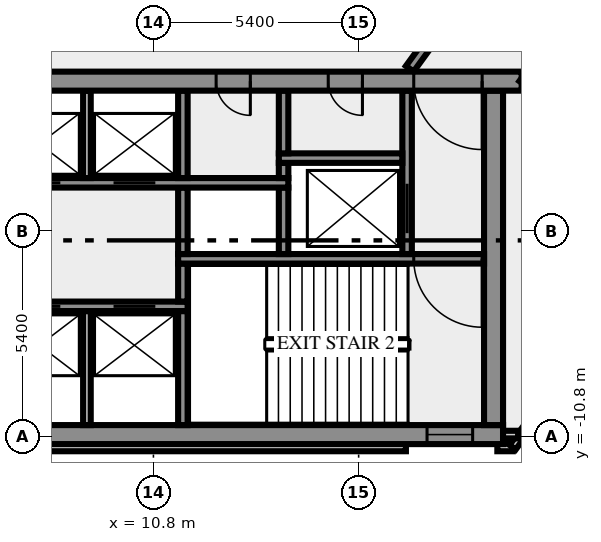
"""IFC4 building model, lengths in metres.
Left out: names, types, materials, properties, quantities, classifications, styles, units other than length and angle.
Written with IfcOpenShell. Run it as: python <this file> out.ifc"""

import sys

from ifc_helpers import new_model, si_unit, direction, frame, frame_2d, origin, place, context, subcontext, project, spatial, rectangle, extrude, element, fill, save


model = new_model("IFC4")
c1 = context("Model", 3, precision=1e-05, world=origin(), true_north=direction((0.0, 1.0)))
c2 = subcontext(c1, "Body", "Model", "MODEL_VIEW")
j1 = project(units=[si_unit("LENGTHUNIT", "METRE"), si_unit("PLANEANGLEUNIT", "RADIAN")], contexts=[c1])
p1 = place(None, origin())
s1 = spatial("IfcSite", under=j1, at=p1, CompositionType="ELEMENT")
p2 = place(p1, origin())
s2 = spatial("IfcBuilding", under=s1, at=p2, CompositionType="ELEMENT")
p3 = place(p2, frame((0.0, 0.0, 176.0)))
s3 = spatial("IfcBuildingStorey", under=s2, at=p3, CompositionType="ELEMENT", Elevation=176.0)
p4 = place(p3, frame((-17.444, -11.088, 0.0), z_axis=(0.0, 0.0, 1.0), x_axis=(1.0, 0.0, 0.0)))
e1 = element("IfcWall", 1, at=p4, inside=s3, PredefinedType="SOLIDWALL", context=c2, shape_type="SweptSolid", body=[
    extrude(rectangle(XDim=34.888, YDim=0.2, at=frame_2d((17.444, 0.0))), origin(), (0.0, 0.0, 1.0), 3.65),
])
p5 = place(p3, frame((19.85, -11.088, 0.0), z_axis=(0.0, 0.0, 1.0), x_axis=(1.0, 0.0, 0.0)))
e2 = element("IfcWall", 2, at=p5, inside=s3, PredefinedType="SOLIDWALL", context=c2, shape_type="SweptSolid", body=[
    extrude(rectangle(XDim=0.406, YDim=0.2, at=frame_2d((0.203, 0.0))), origin(), (0.0, 0.0, 1.0), 3.65),
])
p6 = place(p3, frame((20.253, -11.083, 0.0), z_axis=(0.0, 0.0, 1.0), x_axis=(0.587766567315, 0.809030569476, 0.0)))
e3 = element("IfcWall", 3, at=p6, inside=s3, PredefinedType="SOLIDWALL", context=c2, shape_type="SweptSolid", body=[
    extrude(rectangle(XDim=2.688, YDim=0.2, at=frame_2d((1.344, 0.0))), origin(), (0.0, 0.0, 1.0), 3.65),
])
p7 = place(p3, frame((19.98, -10.75, 0.0), z_axis=(0.0, 0.0, 1.0), x_axis=(1.0, 0.0, 0.0)))
e4 = element("IfcWall", 4, at=p7, inside=s3, PredefinedType="SOLIDWALL", context=c2, shape_type="SweptSolid", body=[
    extrude(rectangle(XDim=0.417, YDim=0.2, at=frame_2d((0.208, 0.0))), origin(), (0.0, 0.0, 1.0), 3.65),
])
p8 = place(p3, frame((-20.0, -10.75, 0.0), z_axis=(0.0, 0.0, 1.0), x_axis=(1.0, 0.0, 0.0)))
e5 = element("IfcWall", 5, at=p8, inside=s3, PredefinedType="SHEAR", context=c2, shape_type="SweptSolid", body=[
    extrude(rectangle(XDim=40.0, YDim=0.5, at=frame_2d((20.0, 0.0))), origin(), (0.0, 0.0, 1.0), 3.65),
])
p9 = place(p8, frame((0.8, 0.0, 1.0)))
e6 = element("IfcOpeningElement", 6, at=p9, cuts=e5, PredefinedType="OPENING", context=c2, shape_type="SweptSolid", body=[
    extrude(rectangle(XDim=1.2, YDim=1.2, at=frame_2d((0.6, 0.6))), frame((0.0, 0.26, 0.0), z_axis=(0.0, -1.0, 0.0), x_axis=(1.0, 0.0, 0.0)), (0.0, 0.0, 1.0), 0.52),
])
p10 = place(p8, frame((38.0, 0.0, 1.0)))
e7 = element("IfcOpeningElement", 7, at=p10, cuts=e5, PredefinedType="OPENING", context=c2, shape_type="SweptSolid", body=[
    extrude(rectangle(XDim=1.2, YDim=1.2, at=frame_2d((0.6, 0.6))), frame((0.0, 0.26, 0.0), z_axis=(0.0, -1.0, 0.0), x_axis=(1.0, 0.0, 0.0)), (0.0, 0.0, 1.0), 0.52),
])
p11 = place(p3, frame((9.05, -10.5, 0.0), z_axis=(0.0, 0.0, 1.0), x_axis=(0.0, 1.0, 0.0)))
e8 = element("IfcWall", 8, at=p11, inside=s3, PredefinedType="SOLIDWALL", context=c2, shape_type="SweptSolid", body=[
    extrude(rectangle(XDim=3.0, YDim=0.2, at=frame_2d((1.5, 0.0))), origin(), (0.0, 0.0, 1.0), 3.65),
])
p12 = place(p3, frame((11.575, -10.5, 0.0), z_axis=(0.0, 0.0, 1.0), x_axis=(0.0, 1.0, 0.0)))
e9 = element("IfcWall", 9, at=p12, inside=s3, PredefinedType="SHEAR", context=c2, shape_type="SweptSolid", body=[
    extrude(rectangle(XDim=3.0, YDim=0.25, at=frame_2d((1.5, 0.0))), origin(), (0.0, 0.0, 1.0), 3.65),
])
p13 = place(p3, frame((19.75, -10.5, 0.0), z_axis=(0.0, 0.0, 1.0), x_axis=(0.0, 1.0, 0.0)))
e10 = element("IfcWall", 10, at=p13, inside=s3, PredefinedType="SHEAR", context=c2, shape_type="SweptSolid", body=[
    extrude(rectangle(XDim=8.8, YDim=0.5, at=frame_2d((4.4, 0.0))), origin(), (0.0, 0.0, 1.0), 3.65),
])
p14 = place(p3, frame((11.7, -7.375, 0.0), z_axis=(0.0, 0.0, 1.0), x_axis=(-1.0, 0.0, 0.0)))
e11 = element("IfcWall", 11, at=p14, inside=s3, PredefinedType="SHEAR", context=c2, shape_type="SweptSolid", body=[
    extrude(rectangle(XDim=23.4, YDim=0.25, at=frame_2d((11.7, 0.0))), origin(), (0.0, 0.0, 1.0), 3.65),
])
p15 = place(p14, frame((20.213, 0.0, 0.0)))
e12 = element("IfcOpeningElement", 12, at=p15, cuts=e11, PredefinedType="OPENING", context=c2, shape_type="SweptSolid", body=[
    extrude(rectangle(XDim=0.9, YDim=2.1, at=frame_2d((0.45, 1.05))), frame((0.0, 0.135, 0.0), z_axis=(0.0, -1.0, 0.0), x_axis=(1.0, 0.0, 0.0)), (0.0, 0.0, 1.0), 0.27),
])
p16 = place(p14, frame((16.488, 0.0, 0.0)))
e13 = element("IfcOpeningElement", 13, at=p16, cuts=e11, PredefinedType="OPENING", context=c2, shape_type="SweptSolid", body=[
    extrude(rectangle(XDim=0.9, YDim=2.1, at=frame_2d((0.45, 1.05))), frame((0.0, 0.135, 0.0), z_axis=(0.0, -1.0, 0.0), x_axis=(1.0, 0.0, 0.0)), (0.0, 0.0, 1.0), 0.27),
])
p17 = place(p14, frame((14.45, 0.0, 0.0)))
e14 = element("IfcOpeningElement", 14, at=p17, cuts=e11, PredefinedType="OPENING", context=c2, shape_type="SweptSolid", body=[
    extrude(rectangle(XDim=0.9, YDim=2.1, at=frame_2d((0.45, 1.05))), frame((0.0, 0.135, 0.0), z_axis=(0.0, -1.0, 0.0), x_axis=(1.0, 0.0, 0.0)), (0.0, 0.0, 1.0), 0.27),
])
p18 = place(p14, frame((12.95, 0.0, 0.0)))
e15 = element("IfcOpeningElement", 15, at=p18, cuts=e11, PredefinedType="OPENING", context=c2, shape_type="SweptSolid", body=[
    extrude(rectangle(XDim=0.9, YDim=2.1, at=frame_2d((0.45, 1.05))), frame((0.0, 0.135, 0.0), z_axis=(0.0, -1.0, 0.0), x_axis=(1.0, 0.0, 0.0)), (0.0, 0.0, 1.0), 0.27),
])
p19 = place(p14, frame((11.475, 0.0, 0.0)))
e16 = element("IfcOpeningElement", 16, at=p19, cuts=e11, PredefinedType="OPENING", context=c2, shape_type="SweptSolid", body=[
    extrude(rectangle(XDim=0.9, YDim=2.1, at=frame_2d((0.45, 1.05))), frame((0.0, 0.135, 0.0), z_axis=(0.0, -1.0, 0.0), x_axis=(1.0, 0.0, 0.0)), (0.0, 0.0, 1.0), 0.27),
])
p20 = place(p14, frame((10.45, 0.0, 0.0)))
e17 = element("IfcOpeningElement", 17, at=p20, cuts=e11, PredefinedType="OPENING", context=c2, shape_type="SweptSolid", body=[
    extrude(rectangle(XDim=0.5, YDim=2.1, at=frame_2d((0.25, 1.05))), frame((0.0, 0.135, 0.0), z_axis=(0.0, -1.0, 0.0), x_axis=(1.0, 0.0, 0.0)), (0.0, 0.0, 1.0), 0.27),
])
p21 = place(p14, frame((8.35, 0.0, 0.0)))
e18 = element("IfcOpeningElement", 18, at=p21, cuts=e11, PredefinedType="OPENING", context=c2, shape_type="SweptSolid", body=[
    extrude(rectangle(XDim=1.1, YDim=2.1, at=frame_2d((0.55, 1.05))), frame((0.0, 0.135, 0.0), z_axis=(0.0, -1.0, 0.0), x_axis=(1.0, 0.0, 0.0)), (0.0, 0.0, 1.0), 0.27),
])
p22 = place(p14, frame((5.85, 0.0, 0.0)))
e19 = element("IfcOpeningElement", 19, at=p22, cuts=e11, PredefinedType="OPENING", context=c2, shape_type="SweptSolid", body=[
    extrude(rectangle(XDim=1.1, YDim=2.1, at=frame_2d((0.55, 1.05))), frame((0.0, 0.135, 0.0), z_axis=(0.0, -1.0, 0.0), x_axis=(1.0, 0.0, 0.0)), (0.0, 0.0, 1.0), 0.27),
])
p23 = place(p14, frame((3.35, 0.0, 0.0)))
e20 = element("IfcOpeningElement", 20, at=p23, cuts=e11, PredefinedType="OPENING", context=c2, shape_type="SweptSolid", body=[
    extrude(rectangle(XDim=1.1, YDim=2.1, at=frame_2d((0.55, 1.05))), frame((0.0, 0.135, 0.0), z_axis=(0.0, -1.0, 0.0), x_axis=(1.0, 0.0, 0.0)), (0.0, 0.0, 1.0), 0.27),
])
p24 = place(p14, frame((0.85, 0.0, 0.0)))
e21 = element("IfcOpeningElement", 21, at=p24, cuts=e11, PredefinedType="OPENING", context=c2, shape_type="SweptSolid", body=[
    extrude(rectangle(XDim=1.1, YDim=2.1, at=frame_2d((0.55, 1.05))), frame((0.0, 0.135, 0.0), z_axis=(0.0, -1.0, 0.0), x_axis=(1.0, 0.0, 0.0)), (0.0, 0.0, 1.0), 0.27),
])
p25 = place(p3, frame((11.575, -7.25, 0.0), z_axis=(0.0, 0.0, 1.0), x_axis=(0.0, 1.0, 0.0)))
e22 = element("IfcWall", 22, at=p25, inside=s3, PredefinedType="SHEAR", context=c2, shape_type="SweptSolid", body=[
    extrude(rectangle(XDim=1.0, YDim=0.25, at=frame_2d((0.5, 0.0))), origin(), (0.0, 0.0, 1.0), 3.65),
])
p26 = place(p3, frame((19.5, -6.125, 0.0), z_axis=(0.0, 0.0, 1.0), x_axis=(-1.0, 0.0, 0.0)))
e23 = element("IfcWall", 23, at=p26, inside=s3, PredefinedType="SHEAR", context=c2, shape_type="SweptSolid", body=[
    extrude(rectangle(XDim=8.05, YDim=0.25, at=frame_2d((4.025, 0.0))), origin(), (0.0, 0.0, 1.0), 3.65),
])
p27 = place(p26, frame((0.05, 0.0, 0.0)))
e24 = element("IfcOpeningElement", 24, at=p27, cuts=e23, PredefinedType="OPENING", context=c2, shape_type="SweptSolid", body=[
    extrude(rectangle(XDim=1.8, YDim=2.1, at=frame_2d((0.9, 1.05))), frame((0.0, 0.135, 0.0), z_axis=(0.0, -1.0, 0.0), x_axis=(1.0, 0.0, 0.0)), (0.0, 0.0, 1.0), 0.27),
])
for number, where, z_axis, x_axis in (
    (25, (11.575, -6.0, 0.0), (0.0, 0.0, 1.0), (0.0, 1.0, 0.0)),
    (26, (14.225, -6.0, 0.0), (0.0, 0.0, 1.0), (0.0, 1.0, 0.0)),
):
    element("IfcWall", number, at=place(p3, frame(where, z_axis=z_axis, x_axis=x_axis)), inside=s3, PredefinedType="SHEAR", context=c2, shape_type="SweptSolid", body=[
        extrude(rectangle(XDim=1.75, YDim=0.25, at=frame_2d((0.875, 0.0))), origin(), (0.0, 0.0, 1.0), 3.65),
    ])
p28 = place(p3, frame((17.475, -6.0, 0.0), z_axis=(0.0, 0.0, 1.0), x_axis=(0.0, 1.0, 0.0)))
e27 = element("IfcWall", 27, at=p28, inside=s3, PredefinedType="SHEAR", context=c2, shape_type="SweptSolid", body=[
    extrude(rectangle(XDim=4.3, YDim=0.25, at=frame_2d((2.15, 0.0))), origin(), (0.0, 0.0, 1.0), 3.65),
])
p29 = place(p28, frame((0.55, 0.0, 0.0)))
e28 = element("IfcOpeningElement", 28, at=p29, cuts=e27, PredefinedType="OPENING", context=c2, shape_type="SweptSolid", body=[
    extrude(rectangle(XDim=1.3, YDim=2.1, at=frame_2d((0.65, 1.05))), frame((0.0, 0.135, 0.0), z_axis=(0.0, -1.0, 0.0), x_axis=(1.0, 0.0, 0.0)), (0.0, 0.0, 1.0), 0.27),
])
p30 = place(p3, frame((-0.6, -4.125, 0.0), z_axis=(0.0, 0.0, 1.0), x_axis=(1.0, 0.0, 0.0)))
e29 = element("IfcWall", 29, at=p30, inside=s3, PredefinedType="SHEAR", context=c2, shape_type="SweptSolid", body=[
    extrude(rectangle(XDim=14.95, YDim=0.25, at=frame_2d((7.475, 0.0))), origin(), (0.0, 0.0, 1.0), 3.65),
])
p31 = place(p30, frame((2.75, 0.0, 0.0)))
e30 = element("IfcOpeningElement", 30, at=p31, cuts=e29, PredefinedType="OPENING", context=c2, shape_type="SweptSolid", body=[
    extrude(rectangle(XDim=1.3, YDim=2.1, at=frame_2d((0.65, 1.05))), frame((0.0, 0.135, 0.0), z_axis=(0.0, -1.0, 0.0), x_axis=(1.0, 0.0, 0.0)), (0.0, 0.0, 1.0), 0.27),
])
p32 = place(p30, frame((5.35, 0.0, 0.0)))
e31 = element("IfcOpeningElement", 31, at=p32, cuts=e29, PredefinedType="OPENING", context=c2, shape_type="SweptSolid", body=[
    extrude(rectangle(XDim=1.1, YDim=2.1, at=frame_2d((0.55, 1.05))), frame((0.0, 0.135, 0.0), z_axis=(0.0, -1.0, 0.0), x_axis=(1.0, 0.0, 0.0)), (0.0, 0.0, 1.0), 0.27),
])
p33 = place(p30, frame((7.85, 0.0, 0.0)))
e32 = element("IfcOpeningElement", 32, at=p33, cuts=e29, PredefinedType="OPENING", context=c2, shape_type="SweptSolid", body=[
    extrude(rectangle(XDim=1.1, YDim=2.1, at=frame_2d((0.55, 1.05))), frame((0.0, 0.135, 0.0), z_axis=(0.0, -1.0, 0.0), x_axis=(1.0, 0.0, 0.0)), (0.0, 0.0, 1.0), 0.27),
])
p34 = place(p30, frame((10.35, 0.0, 0.0)))
e33 = element("IfcOpeningElement", 33, at=p34, cuts=e29, PredefinedType="OPENING", context=c2, shape_type="SweptSolid", body=[
    extrude(rectangle(XDim=1.1, YDim=2.1, at=frame_2d((0.55, 1.05))), frame((0.0, 0.135, 0.0), z_axis=(0.0, -1.0, 0.0), x_axis=(1.0, 0.0, 0.0)), (0.0, 0.0, 1.0), 0.27),
])
p35 = place(p3, frame((9.05, -4.0, 0.0), z_axis=(0.0, 0.0, 1.0), x_axis=(0.0, 1.0, 0.0)))
e34 = element("IfcWall", 34, at=p35, inside=s3, PredefinedType="SOLIDWALL", context=c2, shape_type="SweptSolid", body=[
    extrude(rectangle(XDim=2.3, YDim=0.2, at=frame_2d((1.15, 0.0))), origin(), (0.0, 0.0, 1.0), 3.65),
])
p36 = place(p3, frame((11.575, -4.0, 0.0), z_axis=(0.0, 0.0, 1.0), x_axis=(0.0, 1.0, 0.0)))
e35 = element("IfcWall", 35, at=p36, inside=s3, PredefinedType="SHEAR", context=c2, shape_type="SweptSolid", body=[
    extrude(rectangle(XDim=2.3, YDim=0.25, at=frame_2d((1.15, 0.0))), origin(), (0.0, 0.0, 1.0), 3.65),
])
p37 = place(p3, frame((14.225, -4.0, 0.0), z_axis=(0.0, 0.0, 1.0), x_axis=(0.0, 1.0, 0.0)))
e36 = element("IfcWall", 36, at=p37, inside=s3, PredefinedType="SHEAR", context=c2, shape_type="SweptSolid", body=[
    extrude(rectangle(XDim=0.4, YDim=0.25, at=frame_2d((0.2, 0.0))), origin(), (0.0, 0.0, 1.0), 3.65),
])
p38 = place(p3, frame((14.1, -3.475, 0.0), z_axis=(0.0, 0.0, 1.0), x_axis=(1.0, 0.0, 0.0)))
e37 = element("IfcWall", 37, at=p38, inside=s3, PredefinedType="SHEAR", context=c2, shape_type="SweptSolid", body=[
    extrude(rectangle(XDim=3.25, YDim=0.25, at=frame_2d((1.625, 0.0))), origin(), (0.0, 0.0, 1.0), 3.65),
])
p39 = place(p3, frame((14.225, -3.35, 0.0), z_axis=(0.0, 0.0, 1.0), x_axis=(0.0, 1.0, 0.0)))
e38 = element("IfcWall", 38, at=p39, inside=s3, PredefinedType="SHEAR", context=c2, shape_type="SweptSolid", body=[
    extrude(rectangle(XDim=1.65, YDim=0.25, at=frame_2d((0.825, 0.0))), origin(), (0.0, 0.0, 1.0), 3.65),
])
p40 = place(p3, frame((20.49, -1.45, 0.0), z_axis=(0.0, 0.0, 1.0), x_axis=(-1.0, 0.0, 0.0)))
e39 = element("IfcWall", 39, at=p40, inside=s3, PredefinedType="SHEAR", context=c2, shape_type="SweptSolid", body=[
    extrude(rectangle(XDim=40.98, YDim=0.5, at=frame_2d((20.49, 0.0))), origin(), (0.0, 0.0, 1.0), 3.65),
])
p41 = place(p40, frame((38.14, 0.0, 0.0)))
e40 = element("IfcOpeningElement", 40, at=p41, cuts=e39, PredefinedType="OPENING", context=c2, shape_type="SweptSolid", body=[
    extrude(rectangle(XDim=1.8, YDim=2.1, at=frame_2d((0.9, 1.05))), frame((0.0, 0.26, 0.0), z_axis=(0.0, -1.0, 0.0), x_axis=(1.0, 0.0, 0.0)), (0.0, 0.0, 1.0), 0.52),
])
p42 = place(p40, frame((36.728, 0.0, 0.0)))
e41 = element("IfcOpeningElement", 41, at=p42, cuts=e39, PredefinedType="OPENING", context=c2, shape_type="SweptSolid", body=[
    extrude(rectangle(XDim=0.8, YDim=2.1, at=frame_2d((0.4, 1.05))), frame((0.0, 0.26, 0.0), z_axis=(0.0, -1.0, 0.0), x_axis=(1.0, 0.0, 0.0)), (0.0, 0.0, 1.0), 0.52),
])
p43 = place(p40, frame((35.153, 0.0, 0.0)))
e42 = element("IfcOpeningElement", 42, at=p43, cuts=e39, PredefinedType="OPENING", context=c2, shape_type="SweptSolid", body=[
    extrude(rectangle(XDim=0.8, YDim=2.1, at=frame_2d((0.4, 1.05))), frame((0.0, 0.26, 0.0), z_axis=(0.0, -1.0, 0.0), x_axis=(1.0, 0.0, 0.0)), (0.0, 0.0, 1.0), 0.52),
])
p44 = place(p40, frame((32.94, 0.0, 0.0)))
e43 = element("IfcOpeningElement", 43, at=p44, cuts=e39, PredefinedType="OPENING", context=c2, shape_type="SweptSolid", body=[
    extrude(rectangle(XDim=0.9, YDim=2.1, at=frame_2d((0.45, 1.05))), frame((0.0, 0.26, 0.0), z_axis=(0.0, -1.0, 0.0), x_axis=(1.0, 0.0, 0.0)), (0.0, 0.0, 1.0), 0.52),
])
p45 = place(p40, frame((27.84, 0.0, 0.0)))
e44 = element("IfcOpeningElement", 44, at=p45, cuts=e39, PredefinedType="OPENING", context=c2, shape_type="SweptSolid", body=[
    extrude(rectangle(XDim=0.9, YDim=2.1, at=frame_2d((0.45, 1.05))), frame((0.0, 0.26, 0.0), z_axis=(0.0, -1.0, 0.0), x_axis=(1.0, 0.0, 0.0)), (0.0, 0.0, 1.0), 0.52),
])
p46 = place(p40, frame((21.765, 0.0, 0.0)))
e45 = element("IfcOpeningElement", 45, at=p46, cuts=e39, PredefinedType="OPENING", context=c2, shape_type="SweptSolid", body=[
    extrude(rectangle(XDim=2.0, YDim=2.1, at=frame_2d((1.0, 1.05))), frame((0.0, 0.26, 0.0), z_axis=(0.0, -1.0, 0.0), x_axis=(1.0, 0.0, 0.0)), (0.0, 0.0, 1.0), 0.52),
])
p47 = place(p40, frame((7.14, 0.0, 0.0)))
e46 = element("IfcOpeningElement", 46, at=p47, cuts=e39, PredefinedType="OPENING", context=c2, shape_type="SweptSolid", body=[
    extrude(rectangle(XDim=0.9, YDim=2.1, at=frame_2d((0.45, 1.05))), frame((0.0, 0.26, 0.0), z_axis=(0.0, -1.0, 0.0), x_axis=(1.0, 0.0, 0.0)), (0.0, 0.0, 1.0), 0.52),
])
p48 = place(p40, frame((4.19, 0.0, 0.0)))
e47 = element("IfcOpeningElement", 47, at=p48, cuts=e39, PredefinedType="OPENING", context=c2, shape_type="SweptSolid", body=[
    extrude(rectangle(XDim=0.9, YDim=2.1, at=frame_2d((0.45, 1.05))), frame((0.0, 0.26, 0.0), z_axis=(0.0, -1.0, 0.0), x_axis=(1.0, 0.0, 0.0)), (0.0, 0.0, 1.0), 0.52),
])
p49 = place(p40, frame((1.04, 0.0, 0.0)))
e48 = element("IfcOpeningElement", 48, at=p49, cuts=e39, PredefinedType="OPENING", context=c2, shape_type="SweptSolid", body=[
    extrude(rectangle(XDim=1.8, YDim=2.1, at=frame_2d((0.9, 1.05))), frame((0.0, 0.26, 0.0), z_axis=(0.0, -1.0, 0.0), x_axis=(1.0, 0.0, 0.0)), (0.0, 0.0, 1.0), 0.52),
])
p50 = place(p3, frame((17.545, -1.125, 0.0), z_axis=(0.0, 0.0, 1.0), x_axis=(0.587786330937, 0.809016210693, 0.0)))
e49 = element("IfcWall", 49, at=p50, inside=s3, PredefinedType="SOLIDWALL", context=c2, shape_type="SweptSolid", body=[
    extrude(rectangle(XDim=30.103, YDim=0.25, at=frame_2d((15.052, 0.0))), origin(), (0.0, 0.0, 1.0), 3.65),
])
p51 = place(p50, frame((3.441, 0.0, 0.0)))
e50 = element("IfcOpeningElement", 50, at=p51, cuts=e49, PredefinedType="OPENING", context=c2, shape_type="SweptSolid", body=[
    extrude(rectangle(XDim=0.9, YDim=2.1, at=frame_2d((0.45, 1.05))), frame((0.0, 0.135, 0.0), z_axis=(0.0, -1.0, 0.0), x_axis=(1.0, 0.0, 0.0)), (0.0, 0.0, 1.0), 0.27),
])
p52 = place(p50, frame((23.158, 0.0, 0.0)))
e51 = element("IfcOpeningElement", 51, at=p52, cuts=e49, PredefinedType="OPENING", context=c2, shape_type="SweptSolid", body=[
    extrude(rectangle(XDim=0.9, YDim=2.1, at=frame_2d((0.45, 1.05))), frame((0.0, 0.135, 0.0), z_axis=(0.0, -1.0, 0.0), x_axis=(1.0, 0.0, 0.0)), (0.0, 0.0, 1.0), 0.27),
])
p53 = place(p50, frame((21.558, 0.0, 0.0)))
e52 = element("IfcOpeningElement", 52, at=p53, cuts=e49, PredefinedType="OPENING", context=c2, shape_type="SweptSolid", body=[
    extrude(rectangle(XDim=0.9, YDim=2.1, at=frame_2d((0.45, 1.05))), frame((0.0, 0.135, 0.0), z_axis=(0.0, -1.0, 0.0), x_axis=(1.0, 0.0, 0.0)), (0.0, 0.0, 1.0), 0.27),
])
p54 = place(p3, frame((37.236, 21.469, 0.0), z_axis=(0.0, 0.0, 1.0), x_axis=(-0.58778344073, -0.809018310549, 0.0)))
e53 = element("IfcWall", 53, at=p54, inside=s3, PredefinedType="SOLIDWALL", context=c2, shape_type="SweptSolid", body=[
    extrude(rectangle(XDim=28.42, YDim=0.25, at=frame_2d((14.21, 0.0))), origin(), (0.0, 0.0, 1.0), 3.65),
])
p55 = place(p54, frame((13.205, 0.0, 0.0)))
e54 = element("IfcOpeningElement", 54, at=p55, cuts=e53, PredefinedType="OPENING", context=c2, shape_type="SweptSolid", body=[
    extrude(rectangle(XDim=1.2, YDim=2.1, at=frame_2d((0.6, 1.05))), frame((0.0, 0.135, 0.0), z_axis=(0.0, -1.0, 0.0), x_axis=(1.0, 0.0, 0.0)), (0.0, 0.0, 1.0), 0.27),
])
p56 = place(p54, frame((0.224, 0.0, 0.0)))
e55 = element("IfcOpeningElement", 55, at=p56, cuts=e53, PredefinedType="OPENING", context=c2, shape_type="SweptSolid", body=[
    extrude(rectangle(XDim=0.9, YDim=2.1, at=frame_2d((0.45, 1.05))), frame((0.0, 0.135, 0.0), z_axis=(0.0, -1.0, 0.0), x_axis=(1.0, 0.0, 0.0)), (0.0, 0.0, 1.0), 0.27),
])
p57 = place(p10, origin())
e56 = element("IfcWindow", 56, at=p57, inside=s3, PartitioningType="SINGLE_PANEL", PredefinedType="WINDOW", context=c2, shape_type="SweptSolid", body=[
    extrude(rectangle(XDim=1.2, YDim=1.2, at=frame_2d((0.6, 0.6))), frame((0.0, 0.03, 0.0), z_axis=(0.0, -1.0, 0.0), x_axis=(1.0, 0.0, 0.0)), (0.0, 0.0, 1.0), 0.06),
])
fill(e7, e56)
p58 = place(p23, origin())
e57 = element("IfcDoor", 57, at=p58, inside=s3, OperationType="DOUBLE_DOOR_SLIDING", PredefinedType="DOOR", context=c2, shape_type="SweptSolid", body=[
    extrude(rectangle(XDim=1.1, YDim=2.1, at=frame_2d((0.55, 1.05))), frame((0.0, 0.025, 0.0), z_axis=(0.0, -1.0, 0.0), x_axis=(1.0, 0.0, 0.0)), (0.0, 0.0, 1.0), 0.05),
])
fill(e20, e57)
p59 = place(p24, origin())
e58 = element("IfcDoor", 58, at=p59, inside=s3, OperationType="DOUBLE_DOOR_SLIDING", PredefinedType="DOOR", context=c2, shape_type="SweptSolid", body=[
    extrude(rectangle(XDim=1.1, YDim=2.1, at=frame_2d((0.55, 1.05))), frame((0.0, 0.025, 0.0), z_axis=(0.0, -1.0, 0.0), x_axis=(1.0, 0.0, 0.0)), (0.0, 0.0, 1.0), 0.05),
])
fill(e21, e58)
p60 = place(p27, origin())
e59 = element("IfcDoor", 59, at=p60, inside=s3, OperationType="DOUBLE_DOOR_SINGLE_SWING", PredefinedType="DOOR", context=c2, shape_type="SweptSolid", body=[
    extrude(rectangle(XDim=1.8, YDim=2.1, at=frame_2d((0.9, 1.05))), frame((0.0, 0.025, 0.0), z_axis=(0.0, -1.0, 0.0), x_axis=(1.0, 0.0, 0.0)), (0.0, 0.0, 1.0), 0.05),
])
fill(e24, e59)
p61 = place(p29, origin())
e60 = element("IfcDoor", 60, at=p61, inside=s3, OperationType="DOUBLE_DOOR_SLIDING", PredefinedType="DOOR", context=c2, shape_type="SweptSolid", body=[
    extrude(rectangle(XDim=1.3, YDim=2.1, at=frame_2d((0.65, 1.05))), frame((0.0, 0.025, 0.0), z_axis=(0.0, -1.0, 0.0), x_axis=(1.0, 0.0, 0.0)), (0.0, 0.0, 1.0), 0.05),
])
fill(e28, e60)
p62 = place(p33, origin())
e61 = element("IfcDoor", 61, at=p62, inside=s3, OperationType="DOUBLE_DOOR_SLIDING", PredefinedType="DOOR", context=c2, shape_type="SweptSolid", body=[
    extrude(rectangle(XDim=1.1, YDim=2.1, at=frame_2d((0.55, 1.05))), frame((0.0, 0.025, 0.0), z_axis=(0.0, -1.0, 0.0), x_axis=(1.0, 0.0, 0.0)), (0.0, 0.0, 1.0), 0.05),
])
fill(e32, e61)
p63 = place(p34, origin())
e62 = element("IfcDoor", 62, at=p63, inside=s3, OperationType="DOUBLE_DOOR_SLIDING", PredefinedType="DOOR", context=c2, shape_type="SweptSolid", body=[
    extrude(rectangle(XDim=1.1, YDim=2.1, at=frame_2d((0.55, 1.05))), frame((0.0, 0.025, 0.0), z_axis=(0.0, -1.0, 0.0), x_axis=(1.0, 0.0, 0.0)), (0.0, 0.0, 1.0), 0.05),
])
fill(e33, e62)
p64 = place(p47, origin())
e63 = element("IfcDoor", 63, at=p64, inside=s3, OperationType="SINGLE_SWING_LEFT", PredefinedType="DOOR", context=c2, shape_type="SweptSolid", body=[
    extrude(rectangle(XDim=0.9, YDim=2.1, at=frame_2d((0.45, 1.05))), frame((0.0, 0.025, 0.0), z_axis=(0.0, -1.0, 0.0), x_axis=(1.0, 0.0, 0.0)), (0.0, 0.0, 1.0), 0.05),
])
fill(e46, e63)
p65 = place(p48, origin())
e64 = element("IfcDoor", 64, at=p65, inside=s3, OperationType="SINGLE_SWING_LEFT", PredefinedType="DOOR", context=c2, shape_type="SweptSolid", body=[
    extrude(rectangle(XDim=0.9, YDim=2.1, at=frame_2d((0.45, 1.05))), frame((0.0, 0.025, 0.0), z_axis=(0.0, -1.0, 0.0), x_axis=(1.0, 0.0, 0.0)), (0.0, 0.0, 1.0), 0.05),
])
fill(e47, e64)
p66 = place(p49, origin())
e65 = element("IfcDoor", 65, at=p66, inside=s3, OperationType="DOUBLE_DOOR_SINGLE_SWING", PredefinedType="DOOR", context=c2, shape_type="SweptSolid", body=[
    extrude(rectangle(XDim=1.8, YDim=2.1, at=frame_2d((0.9, 1.05))), frame((0.0, 0.025, 0.0), z_axis=(0.0, -1.0, 0.0), x_axis=(1.0, 0.0, 0.0)), (0.0, 0.0, 1.0), 0.05),
])
fill(e48, e65)
save(model, sys.argv[1])
